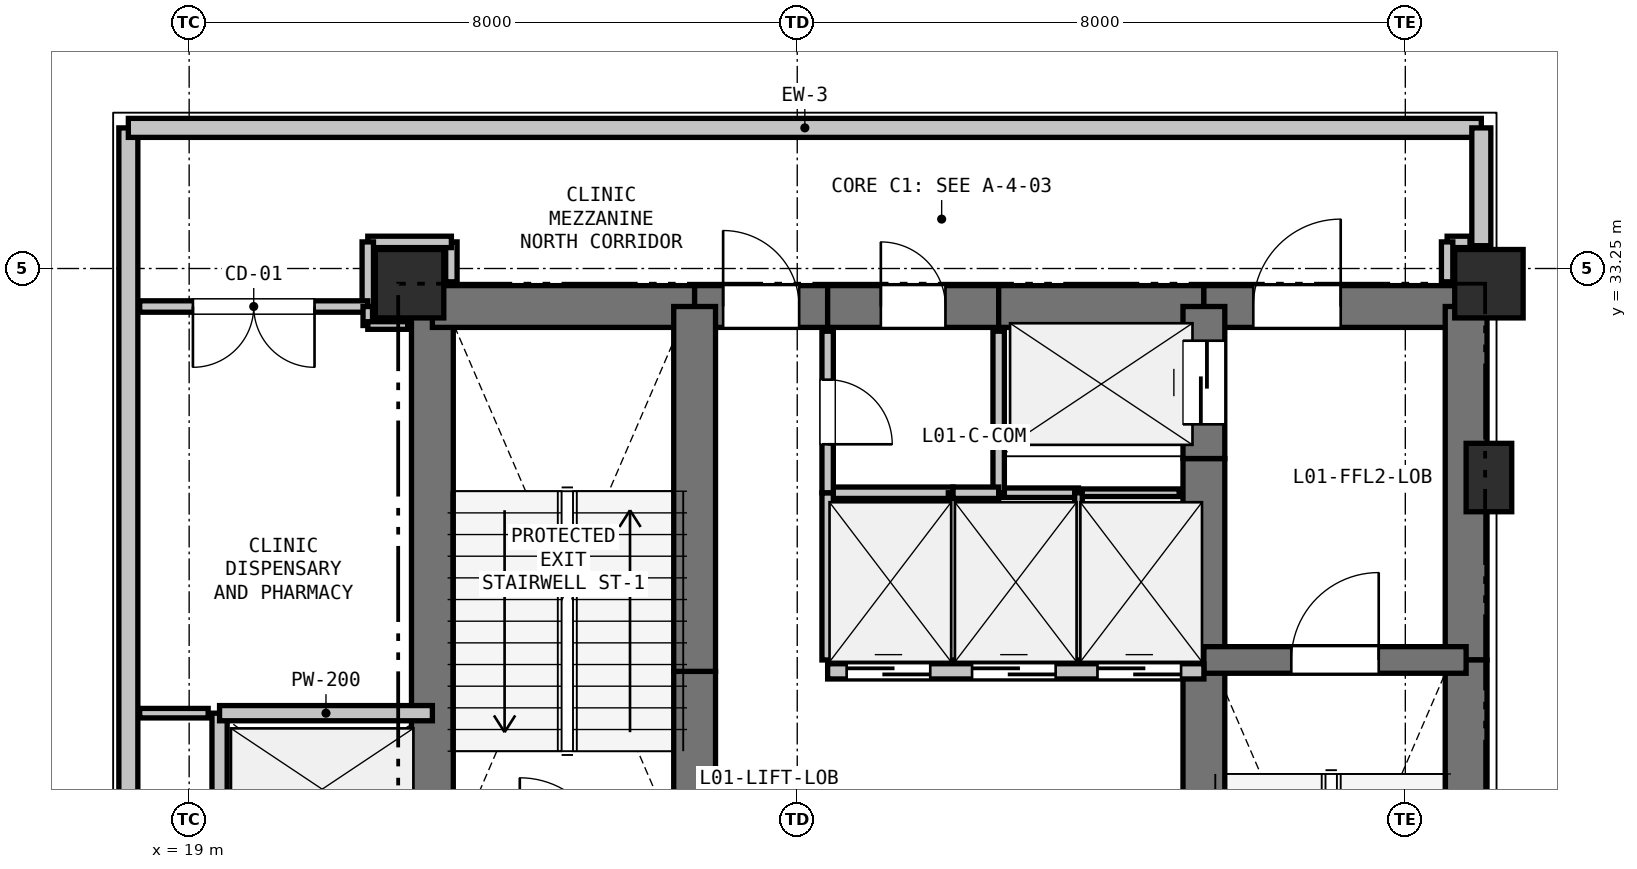
"""IFC4 building model, lengths in metres.
Left out: names, types, materials, properties, quantities, classifications, styles, units other than length and angle.
Written with IfcOpenShell. Run it as: python <this file> out.ifc"""

import sys

from ifc_helpers import new_model, si_unit, direction, frame, frame_2d, origin, origin_2d, place, context, subcontext, project, spatial, rectangle, extrude, element, fill, save


model = new_model("IFC4")
c1 = context("Model", 3, precision=1e-05, world=origin(), true_north=direction((0.0, 1.0)))
c2 = subcontext(c1, "Body", "Model", "MODEL_VIEW")
j1 = project(units=[si_unit("LENGTHUNIT", "METRE"), si_unit("PLANEANGLEUNIT", "RADIAN")], contexts=[c1])
p1 = place(None, origin())
s1 = spatial("IfcSite", under=j1, at=p1, CompositionType="ELEMENT")
p2 = place(p1, origin())
s2 = spatial("IfcBuilding", under=s1, at=p2, CompositionType="ELEMENT")
p3 = place(p2, frame((0.0, 0.0, 5.1)))
s3 = spatial("IfcBuildingStorey", under=s2, at=p3, CompositionType="ELEMENT", Elevation=5.1)
for number, where, z_axis, x_axis in (
    (1, (21.9, 33.05, 0.0), (0.0, 0.0, 1.0), (1.0, 0.0, 0.0)),
    (2, (36.1, 33.05, 0.0), (0.0, 0.0, 1.0), (1.0, 0.0, 0.0)),
):
    element("IfcColumn", number, at=place(p3, frame(where, z_axis=z_axis, x_axis=x_axis)), inside=s3, PredefinedType="COLUMN", context=c2, shape_type="SweptSolid", body=[
        extrude(rectangle(XDim=0.9, YDim=0.9, at=origin_2d()), origin(), (0.0, 0.0, 1.0), 4.5),
    ])
p4 = place(p3, frame((36.1, 30.5, 0.0), z_axis=(0.0, 0.0, 1.0), x_axis=(1.0, 0.0, 0.0)))
e3 = element("IfcColumn", 3, at=p4, inside=s3, PredefinedType="PILASTER", context=c2, shape_type="SweptSolid", body=[
    extrude(rectangle(XDim=0.6, YDim=0.9, at=origin_2d()), origin(), (0.0, 0.0, 1.0), 4.5),
])
p5 = place(p3, frame((18.2, 18.4, 0.0), z_axis=(0.0, 0.0, 1.0), x_axis=(0.0, 1.0, 0.0)))
e4 = element("IfcWall", 4, at=p5, inside=s3, PredefinedType="SOLIDWALL", context=c2, shape_type="SweptSolid", body=[
    extrude(rectangle(XDim=16.7, YDim=0.25, at=frame_2d((8.35, 0.0))), origin(), (0.0, 0.0, 1.0), 2.565),
])
p6 = place(p3, frame((18.2, 35.1, 0.0), z_axis=(0.0, 0.0, 1.0), x_axis=(1.0, 0.0, 0.0)))
e5 = element("IfcWall", 5, at=p6, inside=s3, PredefinedType="SOLIDWALL", context=c2, shape_type="SweptSolid", body=[
    extrude(rectangle(XDim=17.8, YDim=0.25, at=frame_2d((8.9, 0.0))), origin(), (0.0, 0.0, 1.0), 2.565),
])
p7 = place(p3, frame((36.0, 35.1, 0.0), z_axis=(0.0, 0.0, 1.0), x_axis=(0.0, -1.0, 0.0)))
e6 = element("IfcWall", 6, at=p7, inside=s3, PredefinedType="SOLIDWALL", context=c2, shape_type="SweptSolid", body=[
    extrude(rectangle(XDim=1.55, YDim=0.25, at=frame_2d((0.775, 0.0))), origin(), (0.0, 0.0, 1.0), 2.815),
])
p8 = place(p3, frame((22.2, 25.4, 0.0), z_axis=(0.0, 0.0, 1.0), x_axis=(0.0, 1.0, 0.0)))
e7 = element("IfcWall", 7, at=p8, inside=s3, PredefinedType="SHEAR", context=c2, shape_type="SweptSolid", body=[
    extrude(rectangle(XDim=7.35, YDim=0.55, at=frame_2d((3.675, 0.0))), origin(), (0.0, 0.0, 1.0), 4.18),
])
p9 = place(p3, frame((22.2, 32.75, 0.0), z_axis=(0.0, 0.0, 1.0), x_axis=(1.0, 0.0, 0.0)))
e8 = element("IfcWall", 8, at=p9, inside=s3, PredefinedType="SHEAR", context=c2, shape_type="SweptSolid", body=[
    extrude(rectangle(XDim=3.45, YDim=0.55, at=frame_2d((1.725, 0.0))), origin(), (0.0, 0.0, 1.0), 4.18),
])
p10 = place(p3, frame((25.65, 32.75, 0.0), z_axis=(0.0, 0.0, 1.0), x_axis=(1.0, 0.0, 0.0)))
e9 = element("IfcWall", 9, at=p10, inside=s3, PredefinedType="SHEAR", context=c2, shape_type="SweptSolid", body=[
    extrude(rectangle(XDim=1.75, YDim=0.55, at=frame_2d((0.875, 0.0))), origin(), (0.0, 0.0, 1.0), 4.18),
])
p11 = place(p10, frame((0.375, 0.0, 0.0)))
e10 = element("IfcOpeningElement", 10, at=p11, cuts=e9, PredefinedType="OPENING", context=c2, shape_type="SweptSolid", body=[
    extrude(rectangle(XDim=1.0, YDim=2.15, at=frame_2d((0.5, 1.075))), frame((0.0, 0.285, 0.0), z_axis=(0.0, -1.0, 0.0), x_axis=(1.0, 0.0, 0.0)), (0.0, 0.0, 1.0), 0.57),
])
p12 = place(p3, frame((27.4, 32.75, 0.0), z_axis=(0.0, 0.0, 1.0), x_axis=(1.0, 0.0, 0.0)))
e11 = element("IfcWall", 11, at=p12, inside=s3, PredefinedType="SHEAR", context=c2, shape_type="SweptSolid", body=[
    extrude(rectangle(XDim=2.25, YDim=0.55, at=frame_2d((1.125, 0.0))), origin(), (0.0, 0.0, 1.0), 4.18),
])
p13 = place(p12, frame((0.7, 0.0, 0.0)))
e12 = element("IfcOpeningElement", 12, at=p13, cuts=e11, PredefinedType="OPENING", context=c2, shape_type="SweptSolid", body=[
    extrude(rectangle(XDim=0.85, YDim=2.1, at=frame_2d((0.425, 1.05))), frame((0.0, 0.285, 0.0), z_axis=(0.0, -1.0, 0.0), x_axis=(1.0, 0.0, 0.0)), (0.0, 0.0, 1.0), 0.57),
])
p14 = place(p3, frame((29.65, 32.75, 0.0), z_axis=(0.0, 0.0, 1.0), x_axis=(1.0, 0.0, 0.0)))
e13 = element("IfcWall", 13, at=p14, inside=s3, PredefinedType="SHEAR", context=c2, shape_type="SweptSolid", body=[
    extrude(rectangle(XDim=2.7, YDim=0.55, at=frame_2d((1.35, 0.0))), origin(), (0.0, 0.0, 1.0), 4.18),
])
p15 = place(p3, frame((32.35, 32.75, 0.0), z_axis=(0.0, 0.0, 1.0), x_axis=(1.0, 0.0, 0.0)))
e14 = element("IfcWall", 14, at=p15, inside=s3, PredefinedType="SHEAR", context=c2, shape_type="SweptSolid", body=[
    extrude(rectangle(XDim=3.45, YDim=0.55, at=frame_2d((1.725, 0.0))), origin(), (0.0, 0.0, 1.0), 4.18),
])
p16 = place(p15, frame((0.65, 0.0, 0.0)))
e15 = element("IfcOpeningElement", 15, at=p16, cuts=e14, PredefinedType="OPENING", context=c2, shape_type="SweptSolid", body=[
    extrude(rectangle(XDim=1.15, YDim=2.15, at=frame_2d((0.575, 1.075))), frame((0.0, 0.285, 0.0), z_axis=(0.0, -1.0, 0.0), x_axis=(1.0, 0.0, 0.0)), (0.0, 0.0, 1.0), 0.57),
])
p17 = place(p3, frame((35.8, 32.75, 0.0), z_axis=(0.0, 0.0, 1.0), x_axis=(0.0, -1.0, 0.0)))
e16 = element("IfcWall", 16, at=p17, inside=s3, PredefinedType="SHEAR", context=c2, shape_type="SweptSolid", body=[
    extrude(rectangle(XDim=4.65, YDim=0.55, at=frame_2d((2.325, 0.0))), origin(), (0.0, 0.0, 1.0), 4.18),
])
p18 = place(p3, frame((35.8, 28.1, 0.0), z_axis=(0.0, 0.0, 1.0), x_axis=(0.0, -1.0, 0.0)))
e17 = element("IfcWall", 17, at=p18, inside=s3, PredefinedType="SHEAR", context=c2, shape_type="SweptSolid", body=[
    extrude(rectangle(XDim=7.35, YDim=0.55, at=frame_2d((3.675, 0.0))), origin(), (0.0, 0.0, 1.0), 4.18),
])
p19 = place(p3, frame((25.65, 25.55, 0.0), z_axis=(0.0, 0.0, 1.0), x_axis=(0.0, 1.0, 0.0)))
e18 = element("IfcWall", 18, at=p19, inside=s3, PredefinedType="SHEAR", context=c2, shape_type="SweptSolid", body=[
    extrude(rectangle(XDim=2.4, YDim=0.55, at=frame_2d((1.2, 0.0))), origin(), (0.0, 0.0, 1.0), 4.18),
])
p20 = place(p3, frame((25.65, 27.95, 0.0), z_axis=(0.0, 0.0, 1.0), x_axis=(0.0, 1.0, 0.0)))
e19 = element("IfcWall", 19, at=p20, inside=s3, PredefinedType="SHEAR", context=c2, shape_type="SweptSolid", body=[
    extrude(rectangle(XDim=4.8, YDim=0.55, at=frame_2d((2.4, 0.0))), origin(), (0.0, 0.0, 1.0), 4.18),
])
p21 = place(p3, frame((32.35, 25.55, 0.0), z_axis=(0.0, 0.0, 1.0), x_axis=(0.0, 1.0, 0.0)))
e20 = element("IfcWall", 20, at=p21, inside=s3, PredefinedType="SHEAR", context=c2, shape_type="SweptSolid", body=[
    extrude(rectangle(XDim=2.4, YDim=0.55, at=frame_2d((1.2, 0.0))), origin(), (0.0, 0.0, 1.0), 4.18),
])
p22 = place(p3, frame((32.35, 27.95, 0.0), z_axis=(0.0, 0.0, 1.0), x_axis=(0.0, 1.0, 0.0)))
e21 = element("IfcWall", 21, at=p22, inside=s3, PredefinedType="SHEAR", context=c2, shape_type="SweptSolid", body=[
    extrude(rectangle(XDim=2.8, YDim=0.55, at=frame_2d((1.4, 0.0))), origin(), (0.0, 0.0, 1.0), 4.18),
])
p23 = place(p3, frame((32.35, 30.75, 0.0), z_axis=(0.0, 0.0, 1.0), x_axis=(0.0, 1.0, 0.0)))
e22 = element("IfcWall", 22, at=p23, inside=s3, PredefinedType="SHEAR", context=c2, shape_type="SweptSolid", body=[
    extrude(rectangle(XDim=2.0, YDim=0.55, at=frame_2d((1.0, 0.0))), origin(), (0.0, 0.0, 1.0), 4.18),
])
p24 = place(p23, frame((0.45, 0.0, 0.0)))
e23 = element("IfcOpeningElement", 23, at=p24, cuts=e22, PredefinedType="OPENING", context=c2, shape_type="SweptSolid", body=[
    extrude(rectangle(XDim=1.1, YDim=2.15, at=frame_2d((0.55, 1.075))), frame((0.0, 0.285, 0.0), z_axis=(0.0, -1.0, 0.0), x_axis=(1.0, 0.0, 0.0)), (0.0, 0.0, 1.0), 0.57),
])
p25 = place(p3, frame((32.35, 28.1, 0.0), z_axis=(0.0, 0.0, 1.0), x_axis=(1.0, 0.0, 0.0)))
e24 = element("IfcWall", 24, at=p25, inside=s3, PredefinedType="SHEAR", context=c2, shape_type="SweptSolid", body=[
    extrude(rectangle(XDim=3.45, YDim=0.35, at=frame_2d((1.725, 0.0))), origin(), (0.0, 0.0, 1.0), 4.18),
])
p26 = place(p25, frame((1.15, 0.0, 0.0)))
e25 = element("IfcOpeningElement", 25, at=p26, cuts=e24, PredefinedType="OPENING", context=c2, shape_type="SweptSolid", body=[
    extrude(rectangle(XDim=1.15, YDim=2.15, at=frame_2d((0.575, 1.075))), frame((0.0, 0.185, 0.0), z_axis=(0.0, -1.0, 0.0), x_axis=(1.0, 0.0, 0.0)), (0.0, 0.0, 1.0), 0.37),
])
p27 = place(p3, frame((27.4, 27.95, 0.0), z_axis=(0.0, 0.0, 1.0), x_axis=(1.0, 0.0, 0.0)))
e26 = element("IfcWall", 26, at=p27, inside=s3, PredefinedType="PARTITIONING", context=c2, shape_type="SweptSolid", body=[
    extrude(rectangle(XDim=4.95, YDim=0.2, at=frame_2d((2.475, 0.0))), origin(), (0.0, 0.0, 1.0), 4.18),
])
p28 = place(p27, frame((0.25, 0.0, 0.0)))
e27 = element("IfcOpeningElement", 27, at=p28, cuts=e26, PredefinedType="OPENING", context=c2, shape_type="SweptSolid", body=[
    extrude(rectangle(XDim=1.1, YDim=2.15, at=frame_2d((0.55, 1.075))), frame((0.0, 0.11, 0.0), z_axis=(0.0, -1.0, 0.0), x_axis=(1.0, 0.0, 0.0)), (0.0, 0.0, 1.0), 0.22),
])
p29 = place(p27, frame((1.9, 0.0, 0.0)))
e28 = element("IfcOpeningElement", 28, at=p29, cuts=e26, PredefinedType="OPENING", context=c2, shape_type="SweptSolid", body=[
    extrude(rectangle(XDim=1.1, YDim=2.15, at=frame_2d((0.55, 1.075))), frame((0.0, 0.11, 0.0), z_axis=(0.0, -1.0, 0.0), x_axis=(1.0, 0.0, 0.0)), (0.0, 0.0, 1.0), 0.22),
])
p30 = place(p27, frame((3.55, 0.0, 0.0)))
e29 = element("IfcOpeningElement", 29, at=p30, cuts=e26, PredefinedType="OPENING", context=c2, shape_type="SweptSolid", body=[
    extrude(rectangle(XDim=1.1, YDim=2.15, at=frame_2d((0.55, 1.075))), frame((0.0, 0.11, 0.0), z_axis=(0.0, -1.0, 0.0), x_axis=(1.0, 0.0, 0.0)), (0.0, 0.0, 1.0), 0.22),
])
p31 = place(p3, frame((19.4, 25.4, 0.0), z_axis=(0.0, 0.0, 1.0), x_axis=(0.0, 1.0, 0.0)))
e30 = element("IfcWall", 30, at=p31, inside=s3, PredefinedType="PARTITIONING", context=c2, shape_type="SweptSolid", body=[
    extrude(rectangle(XDim=2.0, YDim=0.2, at=frame_2d((1.0, 0.0))), origin(), (0.0, 0.0, 1.0), 2.565),
])
p32 = place(p3, frame((19.4, 27.4, 0.0), z_axis=(0.0, 0.0, 1.0), x_axis=(1.0, 0.0, 0.0)))
e31 = element("IfcWall", 31, at=p32, inside=s3, PredefinedType="PARTITIONING", context=c2, shape_type="SweptSolid", body=[
    extrude(rectangle(XDim=2.8, YDim=0.2, at=frame_2d((1.4, 0.0))), origin(), (0.0, 0.0, 1.0), 3.628),
])
p33 = place(p3, frame((32.025, 30.3, 0.0), z_axis=(0.0, 0.0, 1.0), x_axis=(-1.0, 0.0, 0.0)))
e32 = element("IfcWall", 32, at=p33, inside=s3, PredefinedType="PARTITIONING", context=c2, shape_type="SweptSolid", body=[
    extrude(rectangle(XDim=1.325, YDim=0.1, at=frame_2d((0.663, 0.0))), origin(), (0.0, 0.0, 1.0), 4.18),
])
p34 = place(p3, frame((30.7, 30.3, 0.0), z_axis=(0.0, 0.0, 1.0), x_axis=(-1.0, 0.0, 0.0)))
e33 = element("IfcWall", 33, at=p34, inside=s3, PredefinedType="PARTITIONING", context=c2, shape_type="SweptSolid", body=[
    extrude(rectangle(XDim=1.05, YDim=0.125, at=frame_2d((0.525, 0.0))), origin(), (0.0, 0.0, 1.0), 4.18),
])
p35 = place(p3, frame((29.65, 30.3, 0.0), z_axis=(0.0, 0.0, 1.0), x_axis=(0.0, 1.0, 0.0)))
e34 = element("IfcWall", 34, at=p35, inside=s3, PredefinedType="PARTITIONING", context=c2, shape_type="SweptSolid", body=[
    extrude(rectangle(XDim=2.125, YDim=0.15, at=frame_2d((1.062, 0.0))), origin(), (0.0, 0.0, 1.0), 4.18),
])
p36 = place(p3, frame((27.4, 30.3, 0.0), z_axis=(0.0, 0.0, 1.0), x_axis=(1.0, 0.0, 0.0)))
e35 = element("IfcWall", 35, at=p36, inside=s3, PredefinedType="PARTITIONING", context=c2, shape_type="SweptSolid", body=[
    extrude(rectangle(XDim=1.65, YDim=0.15, at=frame_2d((0.825, 0.0))), origin(), (0.0, 0.0, 1.0), 4.18),
])
p37 = place(p3, frame((29.05, 30.3, 0.0), z_axis=(0.0, 0.0, 1.0), x_axis=(0.0, -1.0, 0.0)))
e36 = element("IfcWall", 36, at=p37, inside=s3, PredefinedType="PARTITIONING", context=c2, shape_type="SweptSolid", body=[
    extrude(rectangle(XDim=2.2, YDim=0.125, at=frame_2d((1.1, 0.0))), origin(), (0.0, 0.0, 1.0), 4.18),
])
p38 = place(p3, frame((27.4, 28.1, 0.0), z_axis=(0.0, 0.0, 1.0), x_axis=(0.0, 1.0, 0.0)))
e37 = element("IfcWall", 37, at=p38, inside=s3, PredefinedType="PARTITIONING", context=c2, shape_type="SweptSolid", body=[
    extrude(rectangle(XDim=2.2, YDim=0.15, at=frame_2d((1.1, 0.0))), origin(), (0.0, 0.0, 1.0), 4.18),
])
p39 = place(p3, frame((29.05, 30.3, 0.0), z_axis=(0.0, 0.0, 1.0), x_axis=(1.0, 0.0, 0.0)))
e38 = element("IfcWall", 38, at=p39, inside=s3, PredefinedType="PARTITIONING", context=c2, shape_type="SweptSolid", body=[
    extrude(rectangle(XDim=0.6, YDim=0.15, at=frame_2d((0.3, 0.0))), origin(), (0.0, 0.0, 1.0), 4.18),
])
p40 = place(p3, frame((30.7, 30.3, 0.0), z_axis=(0.0, 0.0, 1.0), x_axis=(0.0, -1.0, 0.0)))
e39 = element("IfcWall", 39, at=p40, inside=s3, PredefinedType="PARTITIONING", context=c2, shape_type="SweptSolid", body=[
    extrude(rectangle(XDim=2.2, YDim=0.1, at=frame_2d((1.1, 0.0))), origin(), (0.0, 0.0, 1.0), 4.18),
])
p41 = place(p3, frame((27.4, 32.425, 0.0), z_axis=(0.0, 0.0, 1.0), x_axis=(0.0, -1.0, 0.0)))
e40 = element("IfcWall", 40, at=p41, inside=s3, PredefinedType="PARTITIONING", context=c2, shape_type="SweptSolid", body=[
    extrude(rectangle(XDim=2.125, YDim=0.15, at=frame_2d((1.062, 0.0))), origin(), (0.0, 0.0, 1.0), 4.18),
])
p42 = place(p41, frame((0.637, 0.0, 0.0)))
e41 = element("IfcOpeningElement", 41, at=p42, cuts=e40, PredefinedType="OPENING", context=c2, shape_type="SweptSolid", body=[
    extrude(rectangle(XDim=0.85, YDim=2.1, at=frame_2d((0.425, 1.05))), frame((0.0, 0.085, 0.0), z_axis=(0.0, -1.0, 0.0), x_axis=(1.0, 0.0, 0.0)), (0.0, 0.0, 1.0), 0.17),
])
p43 = place(p3, frame((35.851, 33.6, 0.0), z_axis=(0.0, 0.0, 1.0), x_axis=(-1.0, 0.0, 0.0)))
e42 = element("IfcWall", 42, at=p43, inside=s3, PredefinedType="PARTITIONING", context=c2, shape_type="SweptSolid", body=[
    extrude(rectangle(XDim=0.301, YDim=0.15, at=frame_2d((0.15, 0.0))), origin(), (0.0, 0.0, 1.0), 2.815),
])
p44 = place(p3, frame((35.55, 33.6, 0.0), z_axis=(0.0, 0.0, 1.0), x_axis=(0.0, -1.0, 0.0)))
e43 = element("IfcWall", 43, at=p44, inside=s3, PredefinedType="PARTITIONING", context=c2, shape_type="SweptSolid", body=[
    extrude(rectangle(XDim=0.525, YDim=0.15, at=frame_2d((0.263, 0.0))), origin(), (0.0, 0.0, 1.0), 2.815),
])
p45 = place(p3, frame((22.45, 33.075, 0.0), z_axis=(0.0, 0.0, 1.0), x_axis=(0.0, 1.0, 0.0)))
e44 = element("IfcWall", 44, at=p45, inside=s3, PredefinedType="PARTITIONING", context=c2, shape_type="SweptSolid", body=[
    extrude(rectangle(XDim=0.525, YDim=0.15, at=frame_2d((0.263, 0.0))), origin(), (0.0, 0.0, 1.0), 3.628),
])
p46 = place(p3, frame((22.45, 33.6, 0.0), z_axis=(0.0, 0.0, 1.0), x_axis=(-1.0, 0.0, 0.0)))
e45 = element("IfcWall", 45, at=p46, inside=s3, PredefinedType="PARTITIONING", context=c2, shape_type="SweptSolid", body=[
    extrude(rectangle(XDim=1.1, YDim=0.15, at=frame_2d((0.55, 0.0))), origin(), (0.0, 0.0, 1.0), 4.18),
])
p47 = place(p3, frame((21.35, 33.6, 0.0), z_axis=(0.0, 0.0, 1.0), x_axis=(0.0, -1.0, 0.0)))
e46 = element("IfcWall", 46, at=p47, inside=s3, PredefinedType="PARTITIONING", context=c2, shape_type="SweptSolid", body=[
    extrude(rectangle(XDim=0.85, YDim=0.15, at=frame_2d((0.425, 0.0))), origin(), (0.0, 0.0, 1.0), 4.18),
])
p48 = place(p3, frame((21.35, 32.75, 0.0), z_axis=(0.0, 0.0, 1.0), x_axis=(-1.0, 0.0, 0.0)))
e47 = element("IfcWall", 47, at=p48, inside=s3, PredefinedType="PARTITIONING", context=c2, shape_type="SweptSolid", body=[
    extrude(rectangle(XDim=3.001, YDim=0.15, at=frame_2d((1.5, 0.0))), origin(), (0.0, 0.0, 1.0), 4.18),
])
p49 = place(p48, frame((0.7, 0.0, 0.0)))
e48 = element("IfcOpeningElement", 48, at=p49, cuts=e47, PredefinedType="OPENING", context=c2, shape_type="SweptSolid", body=[
    extrude(rectangle(XDim=1.6, YDim=2.2, at=frame_2d((0.8, 1.1))), frame((0.0, 0.085, 0.0), z_axis=(0.0, -1.0, 0.0), x_axis=(1.0, 0.0, 0.0)), (0.0, 0.0, 1.0), 0.17),
])
p50 = place(p3, frame((21.35, 32.75, 0.0), z_axis=(0.0, 0.0, 1.0), x_axis=(0.0, -1.0, 0.0)))
e49 = element("IfcWall", 49, at=p50, inside=s3, PredefinedType="PARTITIONING", context=c2, shape_type="SweptSolid", body=[
    extrude(rectangle(XDim=0.25, YDim=0.125, at=frame_2d((0.125, 0.0))), origin(), (0.0, 0.0, 1.0), 4.18),
])
p51 = place(p3, frame((21.35, 32.5, 0.0), z_axis=(0.0, 0.0, 1.0), x_axis=(1.0, 0.0, 0.0)))
e50 = element("IfcWall", 50, at=p51, inside=s3, PredefinedType="PARTITIONING", context=c2, shape_type="SweptSolid", body=[
    extrude(rectangle(XDim=0.525, YDim=0.1, at=frame_2d((0.262, 0.0))), origin(), (0.0, 0.0, 1.0), 3.628),
])
p52 = place(p3, frame((19.25, 27.4, 0.0), z_axis=(0.0, 0.0, 1.0), x_axis=(-1.0, 0.0, 0.0)))
e51 = element("IfcWall", 51, at=p52, inside=s3, PredefinedType="PARTITIONING", context=c2, shape_type="SweptSolid", body=[
    extrude(rectangle(XDim=0.901, YDim=0.125, at=frame_2d((0.45, 0.0))), origin(), (0.0, 0.0, 1.0), 2.815),
])
p53 = place(p28, origin())
e52 = element("IfcDoor", 52, at=p53, inside=s3, OperationType="SLIDING_TO_LEFT", PredefinedType="DOOR", context=c2, shape_type="SweptSolid", body=[
    extrude(rectangle(XDim=1.1, YDim=2.15, at=frame_2d((0.55, 1.075))), frame((0.0, 0.025, 0.0), z_axis=(0.0, -1.0, 0.0), x_axis=(1.0, 0.0, 0.0)), (0.0, 0.0, 1.0), 0.05),
])
fill(e27, e52)
p54 = place(p29, origin())
e53 = element("IfcDoor", 53, at=p54, inside=s3, OperationType="SLIDING_TO_LEFT", PredefinedType="DOOR", context=c2, shape_type="SweptSolid", body=[
    extrude(rectangle(XDim=1.1, YDim=2.15, at=frame_2d((0.55, 1.075))), frame((0.0, 0.025, 0.0), z_axis=(0.0, -1.0, 0.0), x_axis=(1.0, 0.0, 0.0)), (0.0, 0.0, 1.0), 0.05),
])
fill(e28, e53)
p55 = place(p30, origin())
e54 = element("IfcDoor", 54, at=p55, inside=s3, OperationType="SLIDING_TO_LEFT", PredefinedType="DOOR", context=c2, shape_type="SweptSolid", body=[
    extrude(rectangle(XDim=1.1, YDim=2.15, at=frame_2d((0.55, 1.075))), frame((0.0, 0.025, 0.0), z_axis=(0.0, -1.0, 0.0), x_axis=(1.0, 0.0, 0.0)), (0.0, 0.0, 1.0), 0.05),
])
fill(e29, e54)
p56 = place(p11, origin())
e55 = element("IfcDoor", 55, at=p56, inside=s3, OperationType="SINGLE_SWING_LEFT", PredefinedType="DOOR", context=c2, shape_type="SweptSolid", body=[
    extrude(rectangle(XDim=1.0, YDim=2.15, at=frame_2d((0.5, 1.075))), frame((0.0, 0.025, 0.0), z_axis=(0.0, -1.0, 0.0), x_axis=(1.0, 0.0, 0.0)), (0.0, 0.0, 1.0), 0.05),
])
fill(e10, e55)
p57 = place(p24, origin())
e56 = element("IfcDoor", 56, at=p57, inside=s3, OperationType="SLIDING_TO_LEFT", PredefinedType="DOOR", context=c2, shape_type="SweptSolid", body=[
    extrude(rectangle(XDim=1.1, YDim=2.15, at=frame_2d((0.55, 1.075))), frame((0.0, 0.025, 0.0), z_axis=(0.0, -1.0, 0.0), x_axis=(1.0, 0.0, 0.0)), (0.0, 0.0, 1.0), 0.05),
])
fill(e23, e56)
p58 = place(p26, origin())
e57 = element("IfcDoor", 57, at=p58, inside=s3, OperationType="SINGLE_SWING_RIGHT", PredefinedType="DOOR", context=c2, shape_type="SweptSolid", body=[
    extrude(rectangle(XDim=1.15, YDim=2.15, at=frame_2d((0.575, 1.075))), frame((0.0, 0.025, 0.0), z_axis=(0.0, -1.0, 0.0), x_axis=(1.0, 0.0, 0.0)), (0.0, 0.0, 1.0), 0.05),
])
fill(e25, e57)
p59 = place(p16, origin())
e58 = element("IfcDoor", 58, at=p59, inside=s3, OperationType="SINGLE_SWING_RIGHT", PredefinedType="DOOR", context=c2, shape_type="SweptSolid", body=[
    extrude(rectangle(XDim=1.15, YDim=2.15, at=frame_2d((0.575, 1.075))), frame((0.0, 0.025, 0.0), z_axis=(0.0, -1.0, 0.0), x_axis=(1.0, 0.0, 0.0)), (0.0, 0.0, 1.0), 0.05),
])
fill(e15, e58)
p60 = place(p42, origin())
e59 = element("IfcDoor", 59, at=p60, inside=s3, OperationType="SINGLE_SWING_RIGHT", PredefinedType="DOOR", context=c2, shape_type="SweptSolid", body=[
    extrude(rectangle(XDim=0.85, YDim=2.1, at=frame_2d((0.425, 1.05))), frame((0.0, 0.025, 0.0), z_axis=(0.0, -1.0, 0.0), x_axis=(1.0, 0.0, 0.0)), (0.0, 0.0, 1.0), 0.05),
])
fill(e41, e59)
p61 = place(p13, origin())
e60 = element("IfcDoor", 60, at=p61, inside=s3, OperationType="SINGLE_SWING_LEFT", PredefinedType="DOOR", context=c2, shape_type="SweptSolid", body=[
    extrude(rectangle(XDim=0.85, YDim=2.1, at=frame_2d((0.425, 1.05))), frame((0.0, 0.025, 0.0), z_axis=(0.0, -1.0, 0.0), x_axis=(1.0, 0.0, 0.0)), (0.0, 0.0, 1.0), 0.05),
])
fill(e12, e60)
p62 = place(p49, origin())
e61 = element("IfcDoor", 61, at=p62, inside=s3, OperationType="DOUBLE_DOOR_SINGLE_SWING", PredefinedType="DOOR", context=c2, shape_type="SweptSolid", body=[
    extrude(rectangle(XDim=1.6, YDim=2.2, at=frame_2d((0.8, 1.1))), frame((0.0, 0.025, 0.0), z_axis=(0.0, -1.0, 0.0), x_axis=(1.0, 0.0, 0.0)), (0.0, 0.0, 1.0), 0.05),
])
fill(e48, e61)
save(model, sys.argv[1])
